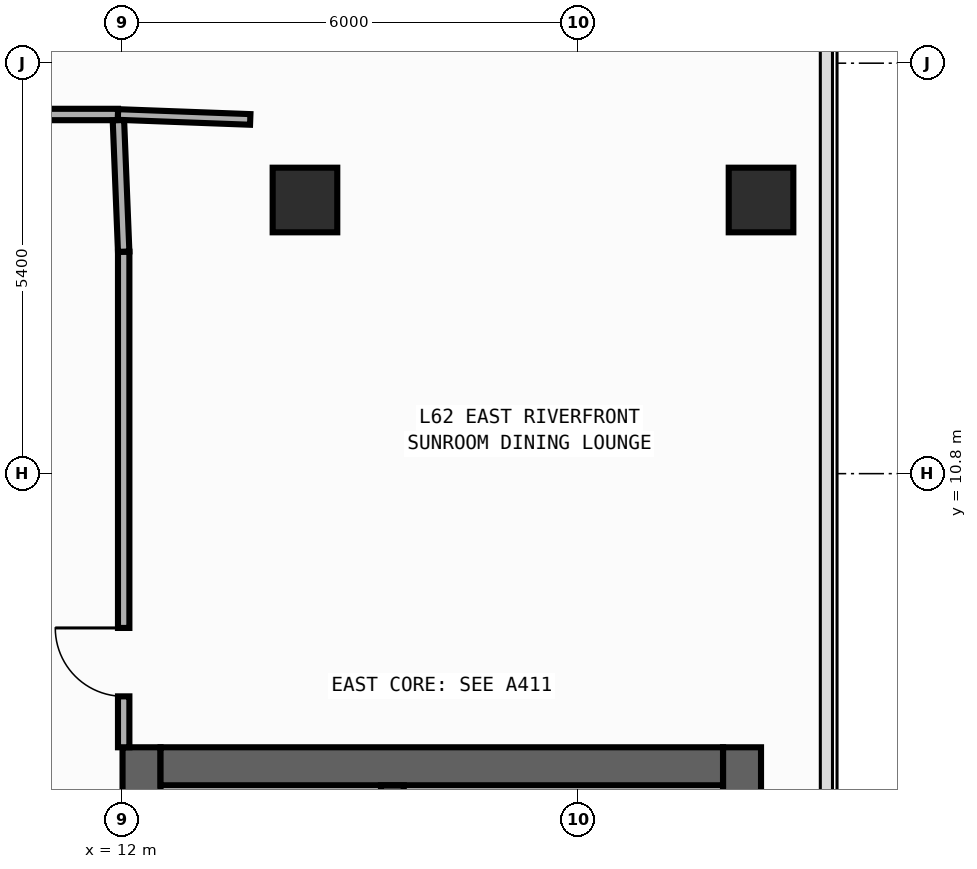
"""IFC4 building model, lengths in metres.
Left out: names, types, materials, properties, quantities, classifications, styles, units other than length and angle.
Written with IfcOpenShell. Run it as: python <this file> out.ifc"""

import sys

from ifc_helpers import new_model, si_unit, direction, frame, frame_2d, origin, origin_2d, place, context, subcontext, project, spatial, rectangle, extrude, element, fill, save


model = new_model("IFC4")
c1 = context("Model", 3, precision=1e-05, world=origin(), true_north=direction((0.0, 1.0)))
c2 = subcontext(c1, "Body", "Model", "MODEL_VIEW")
j1 = project(units=[si_unit("LENGTHUNIT", "METRE"), si_unit("PLANEANGLEUNIT", "RADIAN")], contexts=[c1])
p1 = place(None, origin())
s1 = spatial("IfcSite", under=j1, at=p1, CompositionType="ELEMENT")
p2 = place(p1, origin())
s2 = spatial("IfcBuilding", under=s1, at=p2, CompositionType="ELEMENT")
p3 = place(p2, frame((0.0, 0.0, 262.0)))
s3 = spatial("IfcBuildingStorey", under=s2, at=p3, CompositionType="ELEMENT", Elevation=262.0)
p4 = place(p3, frame((12.25, -19.8, 0.0), z_axis=(0.0, 0.0, 1.0), x_axis=(0.0, 1.0, 0.0)))
e1 = element("IfcWall", 1, at=p4, inside=s3, PredefinedType="SHEAR", context=c2, shape_type="SweptSolid", body=[
    extrude(rectangle(XDim=27.0, YDim=0.5, at=frame_2d((13.5, 0.0))), origin(), (0.0, 0.0, 1.0), 3.34),
])
p5 = place(p4, frame((23.05, 0.0, 0.0)))
e2 = element("IfcOpeningElement", 2, at=p5, cuts=e1, PredefinedType="OPENING", context=c2, shape_type="SweptSolid", body=[
    extrude(rectangle(XDim=1.1, YDim=2.2, at=frame_2d((0.55, 1.1))), frame((0.0, 0.26, 0.0), z_axis=(0.0, -1.0, 0.0), x_axis=(1.0, 0.0, 0.0)), (0.0, 0.0, 1.0), 0.52),
])
p6 = place(p4, frame((19.85, 0.0, 0.0)))
e3 = element("IfcOpeningElement", 3, at=p6, cuts=e1, PredefinedType="OPENING", context=c2, shape_type="SweptSolid", body=[
    extrude(rectangle(XDim=1.1, YDim=2.2, at=frame_2d((0.55, 1.1))), frame((0.0, 0.26, 0.0), z_axis=(0.0, -1.0, 0.0), x_axis=(1.0, 0.0, 0.0)), (0.0, 0.0, 1.0), 0.52),
])
p7 = place(p4, frame((16.65, 0.0, 0.0)))
e4 = element("IfcOpeningElement", 4, at=p7, cuts=e1, PredefinedType="OPENING", context=c2, shape_type="SweptSolid", body=[
    extrude(rectangle(XDim=1.1, YDim=2.2, at=frame_2d((0.55, 1.1))), frame((0.0, 0.26, 0.0), z_axis=(0.0, -1.0, 0.0), x_axis=(1.0, 0.0, 0.0)), (0.0, 0.0, 1.0), 0.52),
])
p8 = place(p4, frame((6.275, 0.0, 0.0)))
e5 = element("IfcOpeningElement", 5, at=p8, cuts=e1, PredefinedType="OPENING", context=c2, shape_type="SweptSolid", body=[
    extrude(rectangle(XDim=0.85, YDim=2.1, at=frame_2d((0.425, 1.05))), frame((0.0, 0.26, 0.0), z_axis=(0.0, -1.0, 0.0), x_axis=(1.0, 0.0, 0.0)), (0.0, 0.0, 1.0), 0.52),
])
p9 = place(p4, frame((8.575, 0.0, 0.0)))
e6 = element("IfcOpeningElement", 6, at=p9, cuts=e1, PredefinedType="OPENING", context=c2, shape_type="SweptSolid", body=[
    extrude(rectangle(XDim=0.85, YDim=2.1, at=frame_2d((0.425, 1.05))), frame((0.0, 0.26, 0.0), z_axis=(0.0, -1.0, 0.0), x_axis=(1.0, 0.0, 0.0)), (0.0, 0.0, 1.0), 0.52),
])
p10 = place(p4, frame((10.675, 0.0, 0.0)))
e7 = element("IfcOpeningElement", 7, at=p10, cuts=e1, PredefinedType="OPENING", context=c2, shape_type="SweptSolid", body=[
    extrude(rectangle(XDim=0.85, YDim=2.1, at=frame_2d((0.425, 1.05))), frame((0.0, 0.26, 0.0), z_axis=(0.0, -1.0, 0.0), x_axis=(1.0, 0.0, 0.0)), (0.0, 0.0, 1.0), 0.52),
])
p11 = place(p4, frame((12.725, 0.0, 0.0)))
e8 = element("IfcOpeningElement", 8, at=p11, cuts=e1, PredefinedType="OPENING", context=c2, shape_type="SweptSolid", body=[
    extrude(rectangle(XDim=1.15, YDim=2.2, at=frame_2d((0.575, 1.1))), frame((0.0, 0.26, 0.0), z_axis=(0.0, -1.0, 0.0), x_axis=(1.0, 0.0, 0.0)), (0.0, 0.0, 1.0), 0.52),
])
p12 = place(p4, frame((25.125, 0.0, 0.0)))
e9 = element("IfcOpeningElement", 9, at=p12, cuts=e1, PredefinedType="OPENING", context=c2, shape_type="SweptSolid", body=[
    extrude(rectangle(XDim=0.85, YDim=2.1, at=frame_2d((0.425, 1.05))), frame((0.0, 0.26, 0.0), z_axis=(0.0, -1.0, 0.0), x_axis=(1.0, 0.0, 0.0)), (0.0, 0.0, 1.0), 0.52),
])
p13 = place(p3, frame((20.15, -19.8, 0.0), z_axis=(0.0, 0.0, 1.0), x_axis=(0.0, 1.0, 0.0)))
e10 = element("IfcWall", 10, at=p13, inside=s3, PredefinedType="SHEAR", context=c2, shape_type="SweptSolid", body=[
    extrude(rectangle(XDim=27.0, YDim=0.5, at=frame_2d((13.5, 0.0))), origin(), (0.0, 0.0, 1.0), 3.34),
])
p14 = place(p3, frame((12.5, 6.95, 0.0), z_axis=(0.0, 0.0, 1.0), x_axis=(1.0, 0.0, 0.0)))
e11 = element("IfcWall", 11, at=p14, inside=s3, PredefinedType="SHEAR", context=c2, shape_type="SweptSolid", body=[
    extrude(rectangle(XDim=7.4, YDim=0.5, at=frame_2d((3.7, 0.0))), origin(), (0.0, 0.0, 1.0), 3.34),
])
p15 = place(p3, frame((15.55, -19.3, 0.0), z_axis=(0.0, 0.0, 1.0), x_axis=(0.0, 1.0, 0.0)))
e12 = element("IfcWall", 12, at=p15, inside=s3, PredefinedType="SHEAR", context=c2, shape_type="SweptSolid", body=[
    extrude(rectangle(XDim=26.0, YDim=0.3, at=frame_2d((13.0, 0.0))), origin(), (0.0, 0.0, 1.0), 3.34),
])
p16 = place(p15, frame((12.225, 0.0, 0.0)))
e13 = element("IfcOpeningElement", 13, at=p16, cuts=e12, PredefinedType="OPENING", context=c2, shape_type="SweptSolid", body=[
    extrude(rectangle(XDim=1.15, YDim=2.2, at=frame_2d((0.575, 1.1))), frame((0.0, 0.16, 0.0), z_axis=(0.0, -1.0, 0.0), x_axis=(1.0, 0.0, 0.0)), (0.0, 0.0, 1.0), 0.32),
])
p17 = place(p15, frame((24.625, 0.0, 0.0)))
e14 = element("IfcOpeningElement", 14, at=p17, cuts=e12, PredefinedType="OPENING", context=c2, shape_type="SweptSolid", body=[
    extrude(rectangle(XDim=0.85, YDim=2.1, at=frame_2d((0.425, 1.05))), frame((0.0, 0.16, 0.0), z_axis=(0.0, -1.0, 0.0), x_axis=(1.0, 0.0, 0.0)), (0.0, 0.0, 1.0), 0.32),
])
for number, where, z_axis, x_axis in (
    (15, (20.4, 14.4, 0.0), (0.0, 0.0, 1.0), (1.0, 0.0, 0.0)),
    (16, (14.4, 14.4, 0.0), (0.0, 0.0, 1.0), (1.0, 0.0, 0.0)),
):
    element("IfcColumn", number, at=place(p3, frame(where, z_axis=z_axis, x_axis=x_axis)), inside=s3, PredefinedType="COLUMN", context=c2, shape_type="SweptSolid", body=[
        extrude(rectangle(XDim=0.85, YDim=0.85, at=origin_2d()), origin(), (0.0, 0.0, 1.0), 3.6),
    ])
p18 = place(p3, frame((12.015, 7.2, 0.0), z_axis=(0.0, 0.0, 1.0), x_axis=(0.0, 1.0, 0.0)))
e17 = element("IfcWall", 17, at=p18, inside=s3, PredefinedType="PARTITIONING", context=c2, shape_type="SweptSolid", body=[
    extrude(rectangle(XDim=6.52, YDim=0.15, at=frame_2d((3.26, 0.0))), origin(), (0.0, 0.0, 1.0), 3.34),
])
p19 = place(p18, frame((0.67, 0.0, 0.0)))
e18 = element("IfcOpeningElement", 18, at=p19, cuts=e17, PredefinedType="OPENING", context=c2, shape_type="SweptSolid", body=[
    extrude(rectangle(XDim=0.9, YDim=2.15, at=frame_2d((0.45, 1.075))), frame((0.0, 0.085, 0.0), z_axis=(0.0, -1.0, 0.0), x_axis=(1.0, 0.0, 0.0)), (0.0, 0.0, 1.0), 0.17),
])
p20 = place(p3, frame((1.69, 15.525, 0.0), z_axis=(0.0, 0.0, 1.0), x_axis=(1.0, 0.0, 0.0)))
e19 = element("IfcWall", 19, at=p20, inside=s3, PredefinedType="PARTITIONING", context=c2, shape_type="SweptSolid", body=[
    extrude(rectangle(XDim=10.25, YDim=0.15, at=frame_2d((5.125, 0.0))), origin(), (0.0, 0.0, 1.0), 3.34),
])
p21 = place(p20, frame((4.876, 0.0, 0.0)))
e20 = element("IfcOpeningElement", 20, at=p21, cuts=e19, PredefinedType="OPENING", context=c2, shape_type="SweptSolid", body=[
    extrude(rectangle(XDim=0.9, YDim=2.15, at=frame_2d((0.45, 1.075))), frame((0.0, 0.085, 0.0), z_axis=(0.0, -1.0, 0.0), x_axis=(1.0, 0.0, 0.0)), (0.0, 0.0, 1.0), 0.17),
])
p22 = place(p3, frame((12.015, 13.72, 0.0), z_axis=(0.0, 0.0, 1.0), x_axis=(-0.040046877756, 0.99919780203, 0.0)))
e21 = element("IfcWall", 21, at=p22, inside=s3, PredefinedType="PARTITIONING", context=c2, shape_type="SweptSolid", body=[
    extrude(rectangle(XDim=1.731, YDim=0.15, at=frame_2d((0.866, 0.0))), origin(), (0.0, 0.0, 1.0), 3.34),
])
p23 = place(p3, frame((11.94, 15.525, 0.0), z_axis=(0.0, 0.0, 1.0), x_axis=(0.999304229002, -0.037296888581, 0.0)))
e22 = element("IfcWall", 22, at=p23, inside=s3, PredefinedType="PARTITIONING", context=c2, shape_type="SweptSolid", body=[
    extrude(rectangle(XDim=1.741, YDim=0.14, at=frame_2d((0.871, 0.0))), origin(), (0.0, 0.0, 1.0), 3.34),
])
p24 = place(p19, origin())
e23 = element("IfcDoor", 23, at=p24, inside=s3, OperationType="SINGLE_SWING_RIGHT", PredefinedType="DOOR", context=c2, shape_type="SweptSolid", body=[
    extrude(rectangle(XDim=0.9, YDim=2.15, at=frame_2d((0.45, 1.075))), frame((0.0, 0.025, 0.0), z_axis=(0.0, -1.0, 0.0), x_axis=(1.0, 0.0, 0.0)), (0.0, 0.0, 1.0), 0.05),
])
fill(e18, e23)
save(model, sys.argv[1])
